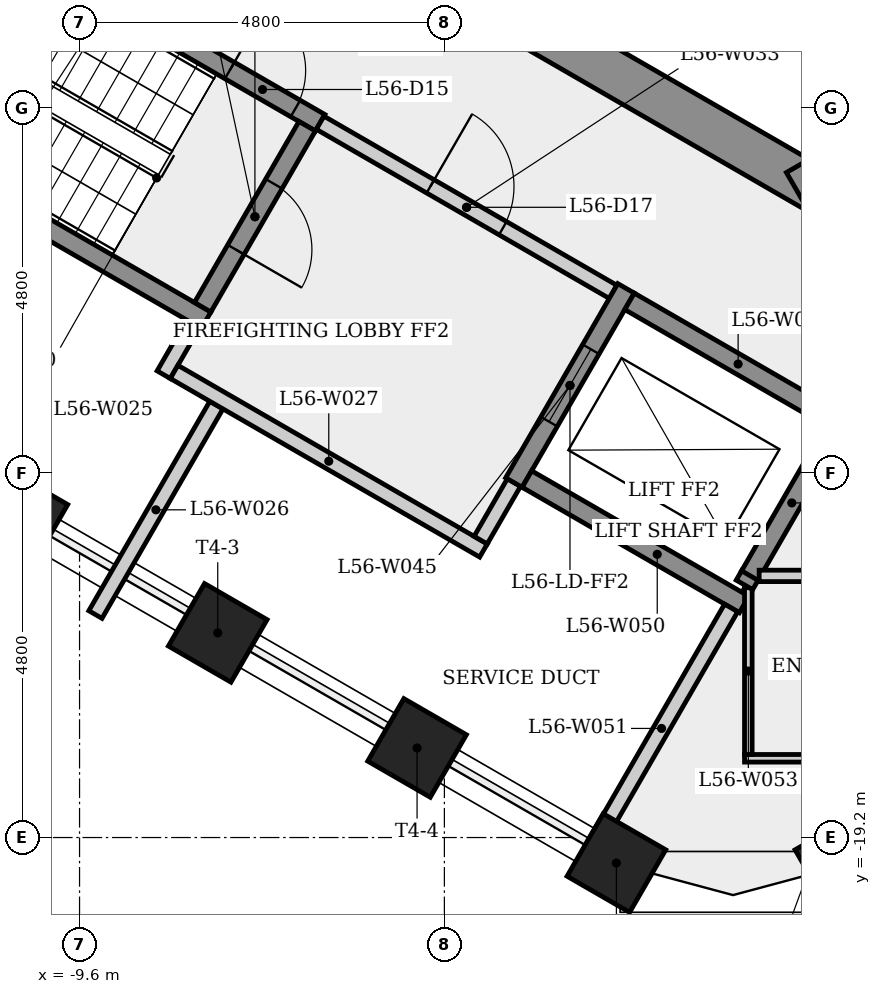
"""IFC4 building model, lengths in metres.
Left out: names, types, materials, properties, quantities, classifications, styles, units other than length and angle.
Written with IfcOpenShell. Run it as: python <this file> out.ifc"""

import sys

from ifc_helpers import new_model, si_unit, direction, frame, frame_2d, origin, origin_2d, place, context, subcontext, project, spatial, rectangle, extrude, element, fill, save


model = new_model("IFC4")
c1 = context("Model", 3, precision=1e-05, world=origin(), true_north=direction((0.0, 1.0)))
c2 = subcontext(c1, "Body", "Model", "MODEL_VIEW")
j1 = project(units=[si_unit("LENGTHUNIT", "METRE"), si_unit("PLANEANGLEUNIT", "RADIAN")], contexts=[c1])
p1 = place(None, origin())
s1 = spatial("IfcSite", under=j1, at=p1, CompositionType="ELEMENT")
p2 = place(p1, origin())
s2 = spatial("IfcBuilding", under=s1, at=p2, CompositionType="ELEMENT")
p3 = place(p2, frame((0.0, 0.0, 210.1)))
s3 = spatial("IfcBuildingStorey", under=s2, at=p3, CompositionType="ELEMENT", Elevation=210.1)
p4 = place(p3, frame((-9.35, -5.225, 0.0), z_axis=(0.0, 0.0, 1.0), x_axis=(0.866023993627, -0.500002442456, 0.0)))
e1 = element("IfcWall", 1, at=p4, inside=s3, PredefinedType="SHEAR", context=c2, shape_type="SweptSolid", body=[
    extrude(rectangle(XDim=10.97, YDim=0.6, at=frame_2d((5.485, 0.0))), origin(), (0.0, 0.0, 1.0), 4.0),
])
p5 = place(p4, frame((3.315, 0.0, 0.0)))
e2 = element("IfcOpeningElement", 2, at=p5, cuts=e1, PredefinedType="OPENING", context=c2, shape_type="SweptSolid", body=[
    extrude(rectangle(XDim=0.9, YDim=2.1, at=frame_2d((0.45, 1.05))), frame((0.0, 0.31, 0.0), z_axis=(0.0, -1.0, 0.0), x_axis=(1.0, 0.0, 0.0)), (0.0, 0.0, 1.0), 0.62),
])
p6 = place(p3, frame((-0.15, -10.71, 0.0), z_axis=(0.0, 0.0, 1.0), x_axis=(0.866023993627, 0.500002442456, 0.0)))
e3 = element("IfcWall", 3, at=p6, inside=s3, PredefinedType="SHEAR", context=c2, shape_type="SweptSolid", body=[
    extrude(rectangle(XDim=10.97, YDim=0.6, at=frame_2d((5.485, 0.0))), origin(), (0.0, 0.0, 1.0), 4.0),
])
p7 = place(p6, frame((4.972, 0.0, 0.0)))
e4 = element("IfcOpeningElement", 4, at=p7, cuts=e3, PredefinedType="OPENING", context=c2, shape_type="SweptSolid", body=[
    extrude(rectangle(XDim=0.9, YDim=2.1, at=frame_2d((0.45, 1.05))), frame((0.0, 0.31, 0.0), z_axis=(0.0, -1.0, 0.0), x_axis=(1.0, 0.0, 0.0)), (0.0, 0.0, 1.0), 0.62),
])
for number, where, z_axis, x_axis in (
    (5, (-10.405, -14.993, 0.0), (0.0, 0.0, 1.0), (-0.5, -0.866, 0.0)),
    (6, (-7.782, -16.507, 0.0), (0.0, 0.0, 1.0), (-0.5, -0.866, 0.0)),
    (7, (-5.159, -18.021, 0.0), (0.0, 0.0, 1.0), (-0.5, -0.866, 0.0)),
    (8, (-2.537, -19.535, 0.0), (0.0, 0.0, 1.0), (-0.5, -0.866, 0.0)),
    (9, (0.463, -19.535, 0.0), (0.0, 0.0, 1.0), (0.5, -0.866, 0.0)),
):
    element("IfcColumn", number, at=place(p3, frame(where, z_axis=z_axis, x_axis=x_axis)), inside=s3, PredefinedType="COLUMN", context=c2, shape_type="SweptSolid", body=[
        extrude(rectangle(XDim=0.95, YDim=0.95, at=origin_2d()), origin(), (0.0, 0.0, 1.0), 4.0),
    ])
p8 = place(p3, frame((-11.977, -6.595, 0.0), z_axis=(0.0, 0.0, 1.0), x_axis=(0.866025499775, -0.499999833739, 0.0)))
e10 = element("IfcWall", 10, at=p8, inside=s3, PredefinedType="SHEAR", context=c2, shape_type="SweptSolid", body=[
    extrude(rectangle(XDim=6.4, YDim=0.25, at=frame_2d((3.2, 0.0))), origin(), (0.0, 0.0, 1.0), 3.6),
])
p9 = place(p8, frame((5.025, 0.0, 0.0)))
e11 = element("IfcOpeningElement", 11, at=p9, cuts=e10, PredefinedType="OPENING", context=c2, shape_type="SweptSolid", body=[
    extrude(rectangle(XDim=1.0, YDim=2.1, at=frame_2d((0.5, 1.05))), frame((0.0, 0.135, 0.0), z_axis=(0.0, -1.0, 0.0), x_axis=(1.0, 0.0, 0.0)), (0.0, 0.0, 1.0), 0.27),
])
p10 = place(p3, frame((-8.493, -13.11, 0.0), z_axis=(0.0, 0.0, 1.0), x_axis=(0.500067724834, 0.865986299303, 0.0)))
e12 = element("IfcWall", 12, at=p10, inside=s3, PredefinedType="PLUMBINGWALL", context=c2, shape_type="SweptSolid", body=[
    extrude(rectangle(XDim=0.775, YDim=0.2, at=frame_2d((0.388, 0.0))), origin(), (0.0, 0.0, 1.0), 3.6),
])
p11 = place(p3, frame((-7.935, -12.393, 0.0), z_axis=(0.0, 0.0, 1.0), x_axis=(-0.866025499775, 0.499999833739, 0.0)))
e13 = element("IfcWall", 13, at=p11, inside=s3, PredefinedType="SHEAR", context=c2, shape_type="SweptSolid", body=[
    extrude(rectangle(XDim=6.4, YDim=0.25, at=frame_2d((3.2, 0.0))), origin(), (0.0, 0.0, 1.0), 3.6),
])
p12 = place(p3, frame((-7.8, -13.51, 0.0), z_axis=(0.0, 0.0, 1.0), x_axis=(-0.500016846771, -0.866015677078, 0.0)))
e14 = element("IfcWall", 14, at=p12, inside=s3, PredefinedType="PLUMBINGWALL", context=c2, shape_type="SweptSolid", body=[
    extrude(rectangle(XDim=3.183, YDim=0.2, at=frame_2d((1.591, 0.0))), origin(), (0.0, 0.0, 1.0), 3.6),
])
p13 = place(p3, frame((-8.356, -13.073, 0.0), z_axis=(0.0, 0.0, 1.0), x_axis=(0.866038532462, -0.499977259774, 0.0)))
e15 = element("IfcWall", 15, at=p13, inside=s3, PredefinedType="PLUMBINGWALL", context=c2, shape_type="SweptSolid", body=[
    extrude(rectangle(XDim=4.7, YDim=0.2, at=frame_2d((2.35, 0.0))), origin(), (0.0, 0.0, 1.0), 3.6),
])
p14 = place(p3, frame((-6.605, -9.841, 0.0), z_axis=(0.0, 0.0, 1.0), x_axis=(-0.499996545922, -0.866027397988, 0.0)))
e16 = element("IfcWall", 16, at=p14, inside=s3, PredefinedType="SHEAR", context=c2, shape_type="SweptSolid", body=[
    extrude(rectangle(XDim=2.75, YDim=0.25, at=frame_2d((1.375, 0.0))), origin(), (0.0, 0.0, 1.0), 3.6),
])
p15 = place(p14, frame((0.875, 0.0, 0.0)))
e17 = element("IfcOpeningElement", 17, at=p15, cuts=e16, PredefinedType="OPENING", context=c2, shape_type="SweptSolid", body=[
    extrude(rectangle(XDim=1.0, YDim=2.1, at=frame_2d((0.5, 1.05))), frame((0.0, 0.135, 0.0), z_axis=(0.0, -1.0, 0.0), x_axis=(1.0, 0.0, 0.0)), (0.0, 0.0, 1.0), 0.27),
])
p16 = place(p3, frame((-6.435, -9.795, 0.0), z_axis=(0.0, 0.0, 1.0), x_axis=(0.866012907634, -0.500021643343, 0.0)))
e18 = element("IfcWall", 18, at=p16, inside=s3, PredefinedType="PARTITIONING", context=c2, shape_type="SweptSolid", body=[
    extrude(rectangle(XDim=4.45, YDim=0.2, at=frame_2d((2.225, 0.0))), origin(), (0.0, 0.0, 1.0), 3.6),
])
p17 = place(p16, frame((1.675, 0.0, 0.0)))
e19 = element("IfcOpeningElement", 19, at=p17, cuts=e18, PredefinedType="OPENING", context=c2, shape_type="SweptSolid", body=[
    extrude(rectangle(XDim=1.1, YDim=2.1, at=frame_2d((0.55, 1.05))), frame((0.0, 0.11, 0.0), z_axis=(0.0, -1.0, 0.0), x_axis=(1.0, 0.0, 0.0)), (0.0, 0.0, 1.0), 0.22),
])
p18 = place(p3, frame((-3.885, -14.529, 0.0), z_axis=(0.0, 0.0, 1.0), x_axis=(-0.499859285417, -0.866106630146, 0.0)))
e20 = element("IfcWall", 20, at=p18, inside=s3, PredefinedType="PLUMBINGWALL", context=c2, shape_type="SweptSolid", body=[
    extrude(rectangle(XDim=0.875, YDim=0.2, at=frame_2d((0.438, 0.0))), origin(), (0.0, 0.0, 1.0), 3.6),
])
p19 = place(p3, frame((-2.41, -11.974, 0.0), z_axis=(0.0, 0.0, 1.0), x_axis=(-0.500001826776, -0.866024349092, 0.0)))
e21 = element("IfcWall", 21, at=p19, inside=s3, PredefinedType="SHEAR", context=c2, shape_type="SweptSolid", body=[
    extrude(rectangle(XDim=2.95, YDim=0.25, at=frame_2d((1.475, 0.0))), origin(), (0.0, 0.0, 1.0), 3.6),
])
p20 = place(p19, frame((0.925, 0.0, 0.0)))
e22 = element("IfcOpeningElement", 22, at=p20, cuts=e21, PredefinedType="OPENING", context=c2, shape_type="SweptSolid", body=[
    extrude(rectangle(XDim=1.1, YDim=2.1, at=frame_2d((0.55, 1.05))), frame((0.0, 0.135, 0.0), z_axis=(0.0, -1.0, 0.0), x_axis=(1.0, 0.0, 0.0)), (0.0, 0.0, 1.0), 0.27),
])
p21 = place(p3, frame((-2.364, -12.145, 0.0), z_axis=(0.0, 0.0, 1.0), x_axis=(0.866040211805, -0.499974350878, 0.0)))
e23 = element("IfcWall", 23, at=p21, inside=s3, PredefinedType="SHEAR", context=c2, shape_type="SweptSolid", body=[
    extrude(rectangle(XDim=3.3, YDim=0.25, at=frame_2d((1.65, 0.0))), origin(), (0.0, 0.0, 1.0), 3.6),
])
p22 = place(p3, frame((-0.856, -16.133, 0.0), z_axis=(0.0, 0.0, 1.0), x_axis=(-0.866021716278, 0.500006386895, 0.0)))
e24 = element("IfcWall", 24, at=p22, inside=s3, PredefinedType="SHEAR", context=c2, shape_type="SweptSolid", body=[
    extrude(rectangle(XDim=3.3, YDim=0.25, at=frame_2d((1.65, 0.0))), origin(), (0.0, 0.0, 1.0), 3.6),
])
p23 = place(p3, frame((-1.027, -16.179, 0.0), z_axis=(0.0, 0.0, 1.0), x_axis=(-0.499989866495, -0.866031254287, 0.0)))
e25 = element("IfcWall", 25, at=p23, inside=s3, PredefinedType="PLUMBINGWALL", context=c2, shape_type="SweptSolid", body=[
    extrude(rectangle(XDim=3.662, YDim=0.2, at=frame_2d((1.831, 0.0))), origin(), (0.0, 0.0, 1.0), 3.6),
])
p24 = place(p3, frame((-0.851, -18.157, 0.0), z_axis=(0.0, 0.0, 1.0), x_axis=(1.0, 0.0, 0.0)))
e26 = element("IfcWall", 26, at=p24, inside=s3, PredefinedType="PARTITIONING", context=c2, shape_type="SweptSolid", body=[
    extrude(rectangle(XDim=2.773, YDim=0.1, at=frame_2d((1.387, 0.0))), origin(), (0.0, 0.0, 1.0), 3.6),
])
p25 = place(p24, frame((1.687, 0.0, 0.0)))
e27 = element("IfcOpeningElement", 27, at=p25, cuts=e26, PredefinedType="OPENING", context=c2, shape_type="SweptSolid", body=[
    extrude(rectangle(XDim=0.8, YDim=2.1, at=frame_2d((0.4, 1.05))), frame((0.0, 0.06, 0.0), z_axis=(0.0, -1.0, 0.0), x_axis=(1.0, 0.0, 0.0)), (0.0, 0.0, 1.0), 0.12),
])
p26 = place(p3, frame((-0.801, -15.912, 0.0), z_axis=(0.0, 0.0, 1.0), x_axis=(0.0, -1.0, 0.0)))
e28 = element("IfcWall", 28, at=p26, inside=s3, PredefinedType="PARTITIONING", context=c2, shape_type="SweptSolid", body=[
    extrude(rectangle(XDim=2.195, YDim=0.1, at=frame_2d((1.098, 0.0))), origin(), (0.0, 0.0, 1.0), 3.6),
])
p27 = place(p3, frame((-0.776, -15.744, 0.0), z_axis=(0.0, 0.0, 1.0), x_axis=(-0.499583827826, -0.866265547609, 0.0)))
e29 = element("IfcWall", 29, at=p27, inside=s3, PredefinedType="SHEAR", context=c2, shape_type="SweptSolid", body=[
    extrude(rectangle(XDim=0.153, YDim=0.25, at=frame_2d((0.076, 0.0))), origin(), (0.0, 0.0, 1.0), 4.0),
])
p28 = place(p3, frame((0.323, -13.841, 0.0), z_axis=(0.0, 0.0, 1.0), x_axis=(-0.500051022034, -0.865995944195, 0.0)))
e30 = element("IfcWall", 30, at=p28, inside=s3, PredefinedType="SHEAR", context=c2, shape_type="SweptSolid", body=[
    extrude(rectangle(XDim=2.208, YDim=0.25, at=frame_2d((1.104, 0.0))), origin(), (0.0, 0.0, 1.0), 4.0),
])
p29 = place(p3, frame((-0.659, -15.757, 0.0), z_axis=(0.0, 0.0, 1.0), x_axis=(1.0, 0.0, 0.0)))
e31 = element("IfcWall", 31, at=p29, inside=s3, PredefinedType="PARTITIONING", context=c2, shape_type="SweptSolid", body=[
    extrude(rectangle(XDim=4.114, YDim=0.15, at=frame_2d((2.057, 0.0))), origin(), (0.0, 0.0, 1.0), 3.6),
])
p30 = place(p29, frame((2.887, 0.0, 0.0)))
e32 = element("IfcOpeningElement", 32, at=p30, cuts=e31, PredefinedType="OPENING", context=c2, shape_type="SweptSolid", body=[
    extrude(rectangle(XDim=0.9, YDim=2.1, at=frame_2d((0.45, 1.05))), frame((0.0, 0.085, 0.0), z_axis=(0.0, -1.0, 0.0), x_axis=(1.0, 0.0, 0.0)), (0.0, 0.0, 1.0), 0.17),
])
p31 = place(p9, origin())
e33 = element("IfcDoor", 33, at=p31, inside=s3, OperationType="SINGLE_SWING_LEFT", PredefinedType="DOOR", context=c2, shape_type="SweptSolid", body=[
    extrude(rectangle(XDim=1.0, YDim=2.1, at=frame_2d((0.5, 1.05))), frame((0.0, 0.025, 0.0), z_axis=(0.0, -1.0, 0.0), x_axis=(1.0, 0.0, 0.0)), (0.0, 0.0, 1.0), 0.05),
])
fill(e11, e33)
p32 = place(p15, origin())
e34 = element("IfcDoor", 34, at=p32, inside=s3, OperationType="SINGLE_SWING_RIGHT", PredefinedType="DOOR", context=c2, shape_type="SweptSolid", body=[
    extrude(rectangle(XDim=1.0, YDim=2.1, at=frame_2d((0.5, 1.05))), frame((0.0, 0.025, 0.0), z_axis=(0.0, -1.0, 0.0), x_axis=(1.0, 0.0, 0.0)), (0.0, 0.0, 1.0), 0.05),
])
fill(e17, e34)
p33 = place(p17, origin())
e35 = element("IfcDoor", 35, at=p33, inside=s3, OperationType="SINGLE_SWING_LEFT", PredefinedType="DOOR", context=c2, shape_type="SweptSolid", body=[
    extrude(rectangle(XDim=1.1, YDim=2.1, at=frame_2d((0.55, 1.05))), frame((0.0, 0.025, 0.0), z_axis=(0.0, -1.0, 0.0), x_axis=(1.0, 0.0, 0.0)), (0.0, 0.0, 1.0), 0.05),
])
fill(e19, e35)
p34 = place(p20, origin())
e36 = element("IfcDoor", 36, at=p34, inside=s3, OperationType="SLIDING_TO_LEFT", PredefinedType="DOOR", context=c2, shape_type="SweptSolid", body=[
    extrude(rectangle(XDim=1.1, YDim=2.1, at=frame_2d((0.55, 1.05))), frame((0.0, 0.025, 0.0), z_axis=(0.0, -1.0, 0.0), x_axis=(1.0, 0.0, 0.0)), (0.0, 0.0, 1.0), 0.05),
])
fill(e22, e36)
save(model, sys.argv[1])
